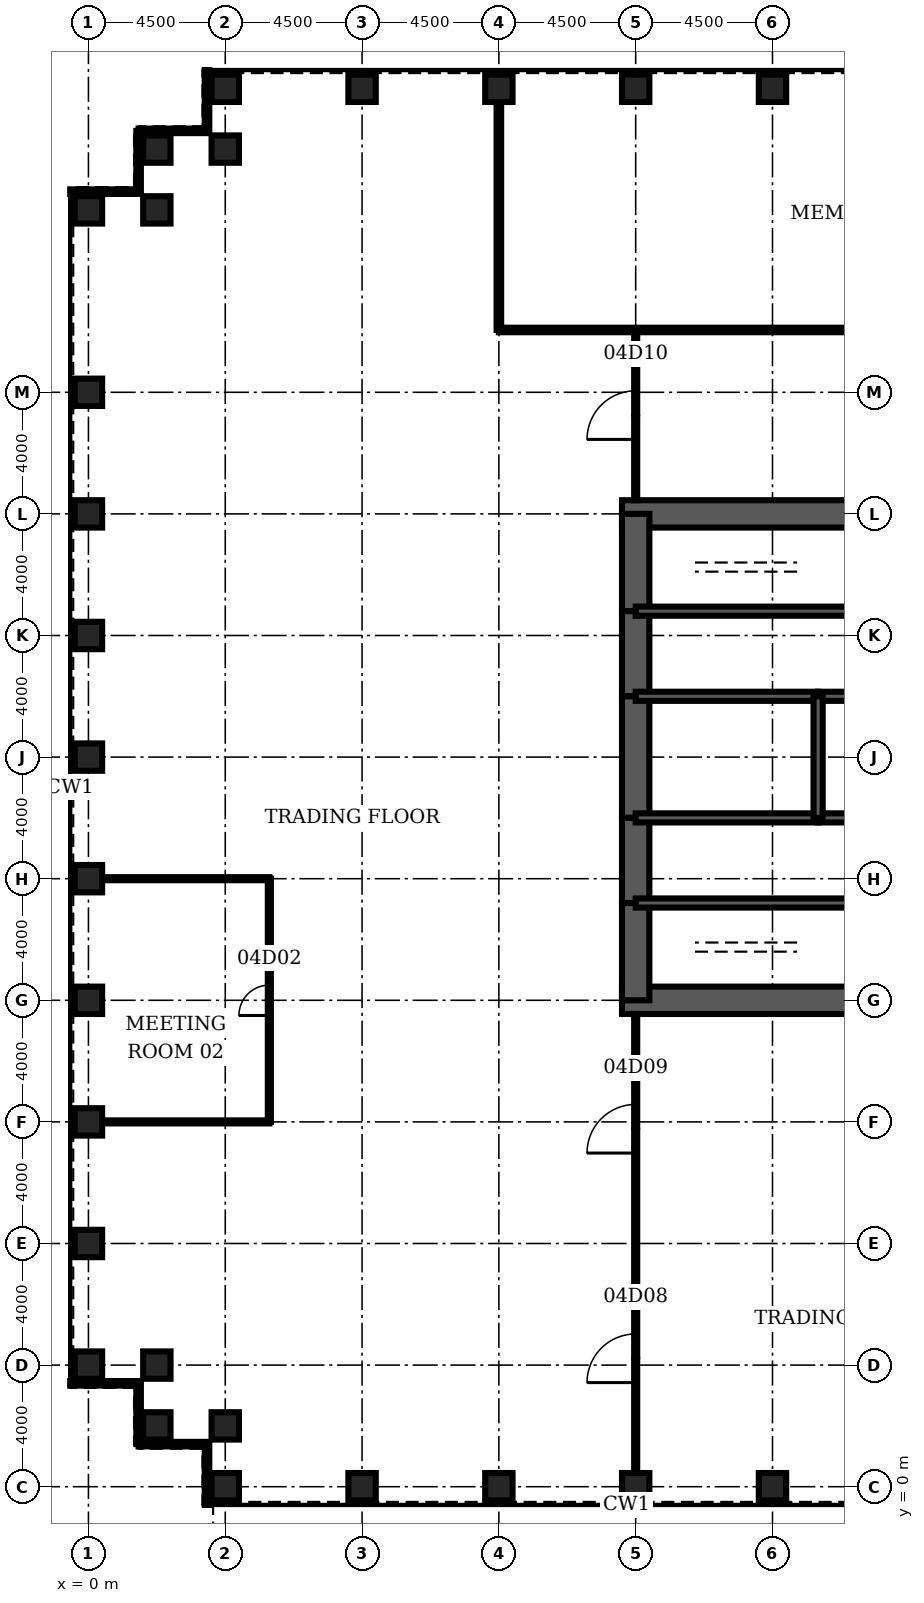
"""IFC4 building model, lengths in metres.
Left out: names, types, materials, properties, quantities, classifications, styles, units other than length and angle.
Written with IfcOpenShell. Run it as: python <this file> out.ifc"""

import sys

from ifc_helpers import new_model, si_unit, direction, frame, frame_2d, origin, origin_2d, place, context, subcontext, project, spatial, rectangle, hollow_rectangle, extrude, element, fill, save


model = new_model("IFC4")
c1 = context("Model", 3, precision=1e-05, world=origin(), true_north=direction((0.0, 1.0)))
c2 = subcontext(c1, "Body", "Model", "MODEL_VIEW")
j1 = project(units=[si_unit("LENGTHUNIT", "METRE"), si_unit("PLANEANGLEUNIT", "RADIAN")], contexts=[c1])
p1 = place(None, origin())
s1 = spatial("IfcSite", under=j1, at=p1, CompositionType="ELEMENT")
p2 = place(p1, origin())
s2 = spatial("IfcBuilding", under=s1, at=p2, CompositionType="ELEMENT")
p3 = place(p2, frame((0.0, 0.0, 23.0)))
s3 = spatial("IfcBuildingStorey", under=s2, at=p3, CompositionType="ELEMENT", Elevation=23.0)
for number, where, z_axis, x_axis in (
    (1, (4.5, 0.0, 0.0), (0.0, 0.0, 1.0), (0.0, 1.0, 0.0)),
    (2, (9.0, 0.0, 0.0), (0.0, 0.0, 1.0), (0.0, 1.0, 0.0)),
    (3, (13.5, 0.0, 0.0), (0.0, 0.0, 1.0), (0.0, 1.0, 0.0)),
    (4, (18.0, 0.0, 0.0), (0.0, 0.0, 1.0), (0.0, 1.0, 0.0)),
    (5, (22.5, 0.0, 0.0), (0.0, 0.0, 1.0), (0.0, 1.0, 0.0)),
    (6, (22.5, 46.0, 0.0), (0.0, 0.0, 1.0), (0.0, 1.0, 0.0)),
    (7, (18.0, 46.0, 0.0), (0.0, 0.0, 1.0), (0.0, 1.0, 0.0)),
    (8, (13.5, 46.0, 0.0), (0.0, 0.0, 1.0), (0.0, 1.0, 0.0)),
    (9, (9.0, 46.0, 0.0), (0.0, 0.0, 1.0), (0.0, 1.0, 0.0)),
    (10, (4.5, 46.0, 0.0), (0.0, 0.0, 1.0), (0.0, 1.0, 0.0)),
    (11, (4.5, 44.0, 0.0), (0.0, 0.0, 1.0), (0.0, 1.0, 0.0)),
    (12, (2.25, 44.0, 0.0), (0.0, 0.0, 1.0), (1.0, 0.0, 0.0)),
    (13, (2.25, 42.0, 0.0), (0.0, 0.0, 1.0), (1.0, 0.0, 0.0)),
    (14, (0.0, 42.0, 0.0), (0.0, 0.0, 1.0), (1.0, 0.0, 0.0)),
    (15, (0.0, 36.0, 0.0), (0.0, 0.0, 1.0), (1.0, 0.0, 0.0)),
    (16, (0.0, 32.0, 0.0), (0.0, 0.0, 1.0), (1.0, 0.0, 0.0)),
    (17, (0.0, 28.0, 0.0), (0.0, 0.0, 1.0), (1.0, 0.0, 0.0)),
    (18, (0.0, 24.0, 0.0), (0.0, 0.0, 1.0), (1.0, 0.0, 0.0)),
    (19, (0.0, 20.0, 0.0), (0.0, 0.0, 1.0), (1.0, 0.0, 0.0)),
    (20, (0.0, 16.0, 0.0), (0.0, 0.0, 1.0), (1.0, 0.0, 0.0)),
    (21, (0.0, 12.0, 0.0), (0.0, 0.0, 1.0), (1.0, 0.0, 0.0)),
    (22, (0.0, 8.0, 0.0), (0.0, 0.0, 1.0), (1.0, 0.0, 0.0)),
    (23, (0.0, 4.0, 0.0), (0.0, 0.0, 1.0), (1.0, 0.0, 0.0)),
    (24, (2.25, 4.0, 0.0), (0.0, 0.0, 1.0), (1.0, 0.0, 0.0)),
    (25, (2.25, 2.0, 0.0), (0.0, 0.0, 1.0), (1.0, 0.0, 0.0)),
    (26, (4.5, 2.0, 0.0), (0.0, 0.0, 1.0), (0.0, 1.0, 0.0)),
):
    element("IfcColumn", number, at=place(p3, frame(where, z_axis=z_axis, x_axis=x_axis)), inside=s3, PredefinedType="COLUMN", context=c2, shape_type="SweptSolid", body=[
        extrude(hollow_rectangle(XDim=0.9, YDim=0.9, WallThickness=0.12, at=origin_2d()), origin(), (0.0, 0.0, 1.0), 4.5),
    ])
for number, where, z_axis, x_axis in (
    (27, (17.55, 16.0, 0.0), (0.0, 0.0, 1.0), (1.0, 0.0, 0.0)),
    (28, (27.0, 32.0, 0.0), (0.0, 0.0, 1.0), (-1.0, 0.0, 0.0)),
):
    element("IfcWall", number, at=place(p3, frame(where, z_axis=z_axis, x_axis=x_axis)), inside=s3, PredefinedType="SHEAR", context=c2, shape_type="SweptSolid", body=[
        extrude(rectangle(XDim=9.45, YDim=0.9, at=frame_2d((4.725, 0.0))), origin(), (0.0, 0.0, 1.0), 4.5),
    ])
p4 = place(p3, frame((18.0, 32.0, 0.0), z_axis=(0.0, 0.0, 1.0), x_axis=(0.0, -1.0, 0.0)))
e29 = element("IfcWall", 29, at=p4, inside=s3, PredefinedType="SHEAR", context=c2, shape_type="SweptSolid", body=[
    extrude(rectangle(XDim=3.2, YDim=0.9, at=frame_2d((1.6, 0.0))), origin(), (0.0, 0.0, 1.0), 4.5),
])
p5 = place(p3, frame((18.0, 28.8, 0.0), z_axis=(0.0, 0.0, 1.0), x_axis=(0.0, -1.0, 0.0)))
e30 = element("IfcWall", 30, at=p5, inside=s3, PredefinedType="SHEAR", context=c2, shape_type="SweptSolid", body=[
    extrude(rectangle(XDim=2.8, YDim=0.9, at=frame_2d((1.4, 0.0))), origin(), (0.0, 0.0, 1.0), 4.5),
])
p6 = place(p5, frame((0.4, 0.0, 0.0)))
e31 = element("IfcOpeningElement", 31, at=p6, cuts=e30, PredefinedType="OPENING", context=c2, shape_type="SweptSolid", body=[
    extrude(rectangle(XDim=1.8, YDim=2.1, at=frame_2d((0.9, 1.05))), frame((0.0, 0.46, 0.0), z_axis=(0.0, -1.0, 0.0), x_axis=(1.0, 0.0, 0.0)), (0.0, 0.0, 1.0), 0.92),
])
p7 = place(p3, frame((18.0, 26.0, 0.0), z_axis=(0.0, 0.0, 1.0), x_axis=(0.0, -1.0, 0.0)))
e32 = element("IfcWall", 32, at=p7, inside=s3, PredefinedType="SHEAR", context=c2, shape_type="SweptSolid", body=[
    extrude(rectangle(XDim=4.0, YDim=0.9, at=frame_2d((2.0, 0.0))), origin(), (0.0, 0.0, 1.0), 4.5),
])
p8 = place(p3, frame((18.0, 22.0, 0.0), z_axis=(0.0, 0.0, 1.0), x_axis=(0.0, -1.0, 0.0)))
e33 = element("IfcWall", 33, at=p8, inside=s3, PredefinedType="SHEAR", context=c2, shape_type="SweptSolid", body=[
    extrude(rectangle(XDim=2.8, YDim=0.9, at=frame_2d((1.4, 0.0))), origin(), (0.0, 0.0, 1.0), 4.5),
])
p9 = place(p8, frame((0.6, 0.0, 0.0)))
e34 = element("IfcOpeningElement", 34, at=p9, cuts=e33, PredefinedType="OPENING", context=c2, shape_type="SweptSolid", body=[
    extrude(rectangle(XDim=1.8, YDim=2.1, at=frame_2d((0.9, 1.05))), frame((0.0, 0.46, 0.0), z_axis=(0.0, -1.0, 0.0), x_axis=(1.0, 0.0, 0.0)), (0.0, 0.0, 1.0), 0.92),
])
p10 = place(p3, frame((18.0, 19.2, 0.0), z_axis=(0.0, 0.0, 1.0), x_axis=(0.0, -1.0, 0.0)))
e35 = element("IfcWall", 35, at=p10, inside=s3, PredefinedType="SHEAR", context=c2, shape_type="SweptSolid", body=[
    extrude(rectangle(XDim=3.2, YDim=0.9, at=frame_2d((1.6, 0.0))), origin(), (0.0, 0.0, 1.0), 4.5),
])
p11 = place(p3, frame((18.0, 19.2, 0.0), z_axis=(0.0, 0.0, 1.0), x_axis=(1.0, 0.0, 0.0)))
e36 = element("IfcWall", 36, at=p11, inside=s3, PredefinedType="SOLIDWALL", context=c2, shape_type="SweptSolid", body=[
    extrude(rectangle(XDim=9.0, YDim=0.3, at=frame_2d((4.5, 0.0))), origin(), (0.0, 0.0, 1.0), 4.5),
])
p12 = place(p11, frame((0.65, 0.0, 0.0)))
e37 = element("IfcOpeningElement", 37, at=p12, cuts=e36, PredefinedType="OPENING", context=c2, shape_type="SweptSolid", body=[
    extrude(rectangle(XDim=1.0, YDim=2.1, at=frame_2d((0.5, 1.05))), frame((0.0, 0.16, 0.0), z_axis=(0.0, -1.0, 0.0), x_axis=(1.0, 0.0, 0.0)), (0.0, 0.0, 1.0), 0.32),
])
p13 = place(p3, frame((18.0, 28.8, 0.0), z_axis=(0.0, 0.0, 1.0), x_axis=(1.0, 0.0, 0.0)))
e38 = element("IfcWall", 38, at=p13, inside=s3, PredefinedType="SOLIDWALL", context=c2, shape_type="SweptSolid", body=[
    extrude(rectangle(XDim=9.0, YDim=0.3, at=frame_2d((4.5, 0.0))), origin(), (0.0, 0.0, 1.0), 4.5),
])
p14 = place(p13, frame((0.65, 0.0, 0.0)))
e39 = element("IfcOpeningElement", 39, at=p14, cuts=e38, PredefinedType="OPENING", context=c2, shape_type="SweptSolid", body=[
    extrude(rectangle(XDim=1.0, YDim=2.1, at=frame_2d((0.5, 1.05))), frame((0.0, 0.16, 0.0), z_axis=(0.0, -1.0, 0.0), x_axis=(1.0, 0.0, 0.0)), (0.0, 0.0, 1.0), 0.32),
])
p15 = place(p3, frame((18.0, 22.0, 0.0), z_axis=(0.0, 0.0, 1.0), x_axis=(1.0, 0.0, 0.0)))
e40 = element("IfcWall", 40, at=p15, inside=s3, PredefinedType="SOLIDWALL", context=c2, shape_type="SweptSolid", body=[
    extrude(rectangle(XDim=6.0, YDim=0.3, at=frame_2d((3.0, 0.0))), origin(), (0.0, 0.0, 1.0), 4.5),
])
p16 = place(p15, frame((4.4, 0.0, 0.0)))
e41 = element("IfcOpeningElement", 41, at=p16, cuts=e40, PredefinedType="OPENING", context=c2, shape_type="SweptSolid", body=[
    extrude(rectangle(XDim=1.0, YDim=2.1, at=frame_2d((0.5, 1.05))), frame((0.0, 0.16, 0.0), z_axis=(0.0, -1.0, 0.0), x_axis=(1.0, 0.0, 0.0)), (0.0, 0.0, 1.0), 0.32),
])
p17 = place(p15, frame((0.7, 0.0, 0.0)))
e42 = element("IfcOpeningElement", 42, at=p17, cuts=e40, PredefinedType="OPENING", context=c2, shape_type="SweptSolid", body=[
    extrude(rectangle(XDim=1.0, YDim=2.1, at=frame_2d((0.5, 1.05))), frame((0.0, 0.16, 0.0), z_axis=(0.0, -1.0, 0.0), x_axis=(1.0, 0.0, 0.0)), (0.0, 0.0, 1.0), 0.32),
])
p18 = place(p3, frame((24.0, 22.0, 0.0), z_axis=(0.0, 0.0, 1.0), x_axis=(1.0, 0.0, 0.0)))
e43 = element("IfcWall", 43, at=p18, inside=s3, PredefinedType="SOLIDWALL", context=c2, shape_type="SweptSolid", body=[
    extrude(rectangle(XDim=3.0, YDim=0.3, at=frame_2d((1.5, 0.0))), origin(), (0.0, 0.0, 1.0), 4.5),
])
p19 = place(p18, frame((1.0, 0.0, 0.0)))
e44 = element("IfcOpeningElement", 44, at=p19, cuts=e43, PredefinedType="OPENING", context=c2, shape_type="SweptSolid", body=[
    extrude(rectangle(XDim=1.0, YDim=2.1, at=frame_2d((0.5, 1.05))), frame((0.0, 0.16, 0.0), z_axis=(0.0, -1.0, 0.0), x_axis=(1.0, 0.0, 0.0)), (0.0, 0.0, 1.0), 0.32),
])
p20 = place(p3, frame((18.0, 26.0, 0.0), z_axis=(0.0, 0.0, 1.0), x_axis=(1.0, 0.0, 0.0)))
e45 = element("IfcWall", 45, at=p20, inside=s3, PredefinedType="SOLIDWALL", context=c2, shape_type="SweptSolid", body=[
    extrude(rectangle(XDim=6.0, YDim=0.3, at=frame_2d((3.0, 0.0))), origin(), (0.0, 0.0, 1.0), 4.5),
])
p21 = place(p3, frame((24.0, 26.0, 0.0), z_axis=(0.0, 0.0, 1.0), x_axis=(1.0, 0.0, 0.0)))
e46 = element("IfcWall", 46, at=p21, inside=s3, PredefinedType="SOLIDWALL", context=c2, shape_type="SweptSolid", body=[
    extrude(rectangle(XDim=3.0, YDim=0.3, at=frame_2d((1.5, 0.0))), origin(), (0.0, 0.0, 1.0), 4.5),
])
p22 = place(p3, frame((24.0, 22.0, 0.0), z_axis=(0.0, 0.0, 1.0), x_axis=(0.0, 1.0, 0.0)))
e47 = element("IfcWall", 47, at=p22, inside=s3, PredefinedType="SOLIDWALL", context=c2, shape_type="SweptSolid", body=[
    extrude(rectangle(XDim=4.0, YDim=0.3, at=frame_2d((2.0, 0.0))), origin(), (0.0, 0.0, 1.0), 4.5),
])
p23 = place(p3, frame((20.025, 22.15, 0.0), z_axis=(0.0, 0.0, 1.0), x_axis=(0.0, 1.0, 0.0)))
e48 = element("IfcWall", 48, at=p23, inside=s3, PredefinedType="PARTITIONING", context=c2, shape_type="SweptSolid", body=[
    extrude(rectangle(XDim=3.7, YDim=0.15, at=frame_2d((1.85, 0.0))), origin(), (0.0, 0.0, 1.0), 3.0),
])
for number, where, z_axis, x_axis in (
    (49, (0.45, 12.0, 0.0), (0.0, 0.0, 1.0), (1.0, 0.0, 0.0)),
    (50, (0.45, 20.0, 0.0), (0.0, 0.0, 1.0), (1.0, 0.0, 0.0)),
):
    element("IfcWall", number, at=place(p3, frame(where, z_axis=z_axis, x_axis=x_axis)), inside=s3, PredefinedType="PARTITIONING", context=c2, shape_type="SweptSolid", body=[
        extrude(rectangle(XDim=5.5, YDim=0.1, at=frame_2d((2.75, 0.0))), origin(), (0.0, 0.0, 1.0), 3.0),
    ])
p24 = place(p3, frame((13.5, 38.05, 0.0), z_axis=(0.0, 0.0, 1.0), x_axis=(1.0, 0.0, 0.0)))
e51 = element("IfcWall", 51, at=p24, inside=s3, PredefinedType="PARTITIONING", context=c2, shape_type="SweptSolid", body=[
    extrude(rectangle(XDim=27.0, YDim=0.15, at=frame_2d((13.5, 0.0))), origin(), (0.0, 0.0, 1.0), 3.0),
])
p25 = place(p24, frame((12.7, 0.0, 0.0)))
e52 = element("IfcOpeningElement", 52, at=p25, cuts=e51, PredefinedType="OPENING", context=c2, shape_type="SweptSolid", body=[
    extrude(rectangle(XDim=1.6, YDim=2.1, at=frame_2d((0.8, 1.05))), frame((0.0, 0.085, 0.0), z_axis=(0.0, -1.0, 0.0), x_axis=(1.0, 0.0, 0.0)), (0.0, 0.0, 1.0), 0.17),
])
p26 = place(p3, frame((5.95, 12.0, 0.0), z_axis=(0.0, 0.0, 1.0), x_axis=(0.0, 1.0, 0.0)))
e53 = element("IfcWall", 53, at=p26, inside=s3, PredefinedType="PARTITIONING", context=c2, shape_type="SweptSolid", body=[
    extrude(rectangle(XDim=8.0, YDim=0.1, at=frame_2d((4.0, 0.0))), origin(), (0.0, 0.0, 1.0), 3.0),
])
p27 = place(p26, frame((3.5, 0.0, 0.0)))
e54 = element("IfcOpeningElement", 54, at=p27, cuts=e53, PredefinedType="OPENING", context=c2, shape_type="SweptSolid", body=[
    extrude(rectangle(XDim=1.0, YDim=2.1, at=frame_2d((0.5, 1.05))), frame((0.0, 0.06, 0.0), z_axis=(0.0, -1.0, 0.0), x_axis=(1.0, 0.0, 0.0)), (0.0, 0.0, 1.0), 0.12),
])
p28 = place(p3, frame((13.5, 38.05, 0.0), z_axis=(0.0, 0.0, 1.0), x_axis=(0.0, 1.0, 0.0)))
e55 = element("IfcWall", 55, at=p28, inside=s3, PredefinedType="PARTITIONING", context=c2, shape_type="SweptSolid", body=[
    extrude(rectangle(XDim=7.5, YDim=0.15, at=frame_2d((3.75, 0.0))), origin(), (0.0, 0.0, 1.0), 3.0),
])
p29 = place(p3, frame((18.0, 0.45, 0.0), z_axis=(0.0, 0.0, 1.0), x_axis=(0.0, 1.0, 0.0)))
e56 = element("IfcWall", 56, at=p29, inside=s3, PredefinedType="PARTITIONING", context=c2, shape_type="SweptSolid", body=[
    extrude(rectangle(XDim=15.1, YDim=0.1, at=frame_2d((7.55, 0.0))), origin(), (0.0, 0.0, 1.0), 3.0),
])
p30 = place(p29, frame((2.975, 0.0, 0.0)))
e57 = element("IfcOpeningElement", 57, at=p30, cuts=e56, PredefinedType="OPENING", context=c2, shape_type="SweptSolid", body=[
    extrude(rectangle(XDim=1.6, YDim=2.1, at=frame_2d((0.8, 1.05))), frame((0.0, 0.06, 0.0), z_axis=(0.0, -1.0, 0.0), x_axis=(1.0, 0.0, 0.0)), (0.0, 0.0, 1.0), 0.12),
])
p31 = place(p29, frame((10.525, 0.0, 0.0)))
e58 = element("IfcOpeningElement", 58, at=p31, cuts=e56, PredefinedType="OPENING", context=c2, shape_type="SweptSolid", body=[
    extrude(rectangle(XDim=1.6, YDim=2.1, at=frame_2d((0.8, 1.05))), frame((0.0, 0.06, 0.0), z_axis=(0.0, -1.0, 0.0), x_axis=(1.0, 0.0, 0.0)), (0.0, 0.0, 1.0), 0.12),
])
p32 = place(p3, frame((18.0, 32.45, 0.0), z_axis=(0.0, 0.0, 1.0), x_axis=(0.0, 1.0, 0.0)))
e59 = element("IfcWall", 59, at=p32, inside=s3, PredefinedType="PARTITIONING", context=c2, shape_type="SweptSolid", body=[
    extrude(rectangle(XDim=5.6, YDim=0.1, at=frame_2d((2.8, 0.0))), origin(), (0.0, 0.0, 1.0), 3.0),
])
p33 = place(p32, frame((2.0, 0.0, 0.0)))
e60 = element("IfcOpeningElement", 60, at=p33, cuts=e59, PredefinedType="OPENING", context=c2, shape_type="SweptSolid", body=[
    extrude(rectangle(XDim=1.6, YDim=2.1, at=frame_2d((0.8, 1.05))), frame((0.0, 0.06, 0.0), z_axis=(0.0, -1.0, 0.0), x_axis=(1.0, 0.0, 0.0)), (0.0, 0.0, 1.0), 0.12),
])
p34 = place(p3, frame((3.9, 46.6, 0.0), z_axis=(0.0, 0.0, 1.0), x_axis=(0.0, -1.0, 0.0)))
e61 = element("IfcWall", 61, at=p34, inside=s3, PredefinedType="ELEMENTEDWALL", context=c2, shape_type="SweptSolid", body=[
    extrude(rectangle(XDim=2.0, YDim=0.15, at=frame_2d((1.0, 0.0))), origin(), (0.0, 0.0, 1.0), 4.32),
])
p35 = place(p3, frame((3.9, 44.6, 0.0), z_axis=(0.0, 0.0, 1.0), x_axis=(-1.0, 0.0, 0.0)))
e62 = element("IfcWall", 62, at=p35, inside=s3, PredefinedType="ELEMENTEDWALL", context=c2, shape_type="SweptSolid", body=[
    extrude(rectangle(XDim=2.25, YDim=0.15, at=frame_2d((1.125, 0.0))), origin(), (0.0, 0.0, 1.0), 4.32),
])
p36 = place(p3, frame((1.65, 44.6, 0.0), z_axis=(0.0, 0.0, 1.0), x_axis=(0.0, -1.0, 0.0)))
e63 = element("IfcWall", 63, at=p36, inside=s3, PredefinedType="ELEMENTEDWALL", context=c2, shape_type="SweptSolid", body=[
    extrude(rectangle(XDim=2.0, YDim=0.15, at=frame_2d((1.0, 0.0))), origin(), (0.0, 0.0, 1.0), 4.32),
])
for number, where, z_axis, x_axis in (
    (64, (1.65, 42.6, 0.0), (0.0, 0.0, 1.0), (-1.0, 0.0, 0.0)),
    (65, (-0.6, 3.4, 0.0), (0.0, 0.0, 1.0), (1.0, 0.0, 0.0)),
):
    element("IfcWall", number, at=place(p3, frame(where, z_axis=z_axis, x_axis=x_axis)), inside=s3, PredefinedType="ELEMENTEDWALL", context=c2, shape_type="SweptSolid", body=[
        extrude(rectangle(XDim=2.25, YDim=0.15, at=frame_2d((1.125, 0.0))), origin(), (0.0, 0.0, 1.0), 4.32),
    ])
p37 = place(p3, frame((1.65, 3.4, 0.0), z_axis=(0.0, 0.0, 1.0), x_axis=(0.0, -1.0, 0.0)))
e66 = element("IfcWall", 66, at=p37, inside=s3, PredefinedType="ELEMENTEDWALL", context=c2, shape_type="SweptSolid", body=[
    extrude(rectangle(XDim=2.0, YDim=0.15, at=frame_2d((1.0, 0.0))), origin(), (0.0, 0.0, 1.0), 4.32),
])
p38 = place(p3, frame((1.65, 1.4, 0.0), z_axis=(0.0, 0.0, 1.0), x_axis=(1.0, 0.0, 0.0)))
e67 = element("IfcWall", 67, at=p38, inside=s3, PredefinedType="ELEMENTEDWALL", context=c2, shape_type="SweptSolid", body=[
    extrude(rectangle(XDim=2.25, YDim=0.15, at=frame_2d((1.125, 0.0))), origin(), (0.0, 0.0, 1.0), 4.32),
])
p39 = place(p3, frame((3.9, 1.4, 0.0), z_axis=(0.0, 0.0, 1.0), x_axis=(0.0, -1.0, 0.0)))
e68 = element("IfcWall", 68, at=p39, inside=s3, PredefinedType="ELEMENTEDWALL", context=c2, shape_type="SweptSolid", body=[
    extrude(rectangle(XDim=2.0, YDim=0.15, at=frame_2d((1.0, 0.0))), origin(), (0.0, 0.0, 1.0), 4.32),
])
p40 = place(p27, origin())
e69 = element("IfcDoor", 69, at=p40, inside=s3, OperationType="SINGLE_SWING_LEFT", PredefinedType="DOOR", context=c2, shape_type="SweptSolid", body=[
    extrude(rectangle(XDim=1.0, YDim=2.1, at=frame_2d((0.5, 1.05))), frame((0.0, 0.025, 0.0), z_axis=(0.0, -1.0, 0.0), x_axis=(1.0, 0.0, 0.0)), (0.0, 0.0, 1.0), 0.05),
])
fill(e54, e69)
p41 = place(p30, origin())
e70 = element("IfcDoor", 70, at=p41, inside=s3, OperationType="SINGLE_SWING_LEFT", PredefinedType="DOOR", context=c2, shape_type="SweptSolid", body=[
    extrude(rectangle(XDim=1.6, YDim=2.1, at=frame_2d((0.8, 1.05))), frame((0.0, 0.025, 0.0), z_axis=(0.0, -1.0, 0.0), x_axis=(1.0, 0.0, 0.0)), (0.0, 0.0, 1.0), 0.05),
])
fill(e57, e70)
p42 = place(p31, origin())
e71 = element("IfcDoor", 71, at=p42, inside=s3, OperationType="SINGLE_SWING_LEFT", PredefinedType="DOOR", context=c2, shape_type="SweptSolid", body=[
    extrude(rectangle(XDim=1.6, YDim=2.1, at=frame_2d((0.8, 1.05))), frame((0.0, 0.025, 0.0), z_axis=(0.0, -1.0, 0.0), x_axis=(1.0, 0.0, 0.0)), (0.0, 0.0, 1.0), 0.05),
])
fill(e58, e71)
p43 = place(p33, origin())
e72 = element("IfcDoor", 72, at=p43, inside=s3, OperationType="SINGLE_SWING_LEFT", PredefinedType="DOOR", context=c2, shape_type="SweptSolid", body=[
    extrude(rectangle(XDim=1.6, YDim=2.1, at=frame_2d((0.8, 1.05))), frame((0.0, 0.025, 0.0), z_axis=(0.0, -1.0, 0.0), x_axis=(1.0, 0.0, 0.0)), (0.0, 0.0, 1.0), 0.05),
])
fill(e60, e72)
p44 = place(p12, origin())
e73 = element("IfcDoor", 73, at=p44, inside=s3, OperationType="SINGLE_SWING_LEFT", PredefinedType="DOOR", context=c2, shape_type="SweptSolid", body=[
    extrude(rectangle(XDim=1.0, YDim=2.1, at=frame_2d((0.5, 1.05))), frame((0.0, 0.025, 0.0), z_axis=(0.0, -1.0, 0.0), x_axis=(1.0, 0.0, 0.0)), (0.0, 0.0, 1.0), 0.05),
])
fill(e37, e73)
p45 = place(p14, origin())
e74 = element("IfcDoor", 74, at=p45, inside=s3, OperationType="SINGLE_SWING_LEFT", PredefinedType="DOOR", context=c2, shape_type="SweptSolid", body=[
    extrude(rectangle(XDim=1.0, YDim=2.1, at=frame_2d((0.5, 1.05))), frame((0.0, 0.025, 0.0), z_axis=(0.0, -1.0, 0.0), x_axis=(1.0, 0.0, 0.0)), (0.0, 0.0, 1.0), 0.05),
])
fill(e39, e74)
p46 = place(p9, origin())
e75 = element("IfcDoor", 75, at=p46, inside=s3, OperationType="SINGLE_SWING_LEFT", PredefinedType="DOOR", context=c2, shape_type="SweptSolid", body=[
    extrude(rectangle(XDim=1.8, YDim=2.1, at=frame_2d((0.9, 1.05))), frame((0.0, 0.45, 0.0), z_axis=(0.0, -1.0, 0.0), x_axis=(1.0, 0.0, 0.0)), (0.0, 0.0, 1.0), 0.899),
])
fill(e34, e75)
p47 = place(p6, origin())
e76 = element("IfcDoor", 76, at=p47, inside=s3, OperationType="SINGLE_SWING_LEFT", PredefinedType="DOOR", context=c2, shape_type="SweptSolid", body=[
    extrude(rectangle(XDim=1.8, YDim=2.1, at=frame_2d((0.9, 1.05))), frame((0.0, 0.45, 0.0), z_axis=(0.0, -1.0, 0.0), x_axis=(1.0, 0.0, 0.0)), (0.0, 0.0, 1.0), 0.899),
])
fill(e31, e76)
p48 = place(p16, origin())
e77 = element("IfcDoor", 77, at=p48, inside=s3, OperationType="SINGLE_SWING_RIGHT", PredefinedType="DOOR", context=c2, shape_type="SweptSolid", body=[
    extrude(rectangle(XDim=1.0, YDim=2.1, at=frame_2d((0.5, 1.05))), frame((0.0, 0.025, 0.0), z_axis=(0.0, -1.0, 0.0), x_axis=(1.0, 0.0, 0.0)), (0.0, 0.0, 1.0), 0.05),
])
fill(e41, e77)
p49 = place(p17, origin())
e78 = element("IfcDoor", 78, at=p49, inside=s3, OperationType="SINGLE_SWING_LEFT", PredefinedType="DOOR", context=c2, shape_type="SweptSolid", body=[
    extrude(rectangle(XDim=1.0, YDim=2.1, at=frame_2d((0.5, 1.05))), frame((0.0, 0.025, 0.0), z_axis=(0.0, -1.0, 0.0), x_axis=(1.0, 0.0, 0.0)), (0.0, 0.0, 1.0), 0.05),
])
fill(e42, e78)
save(model, sys.argv[1])
